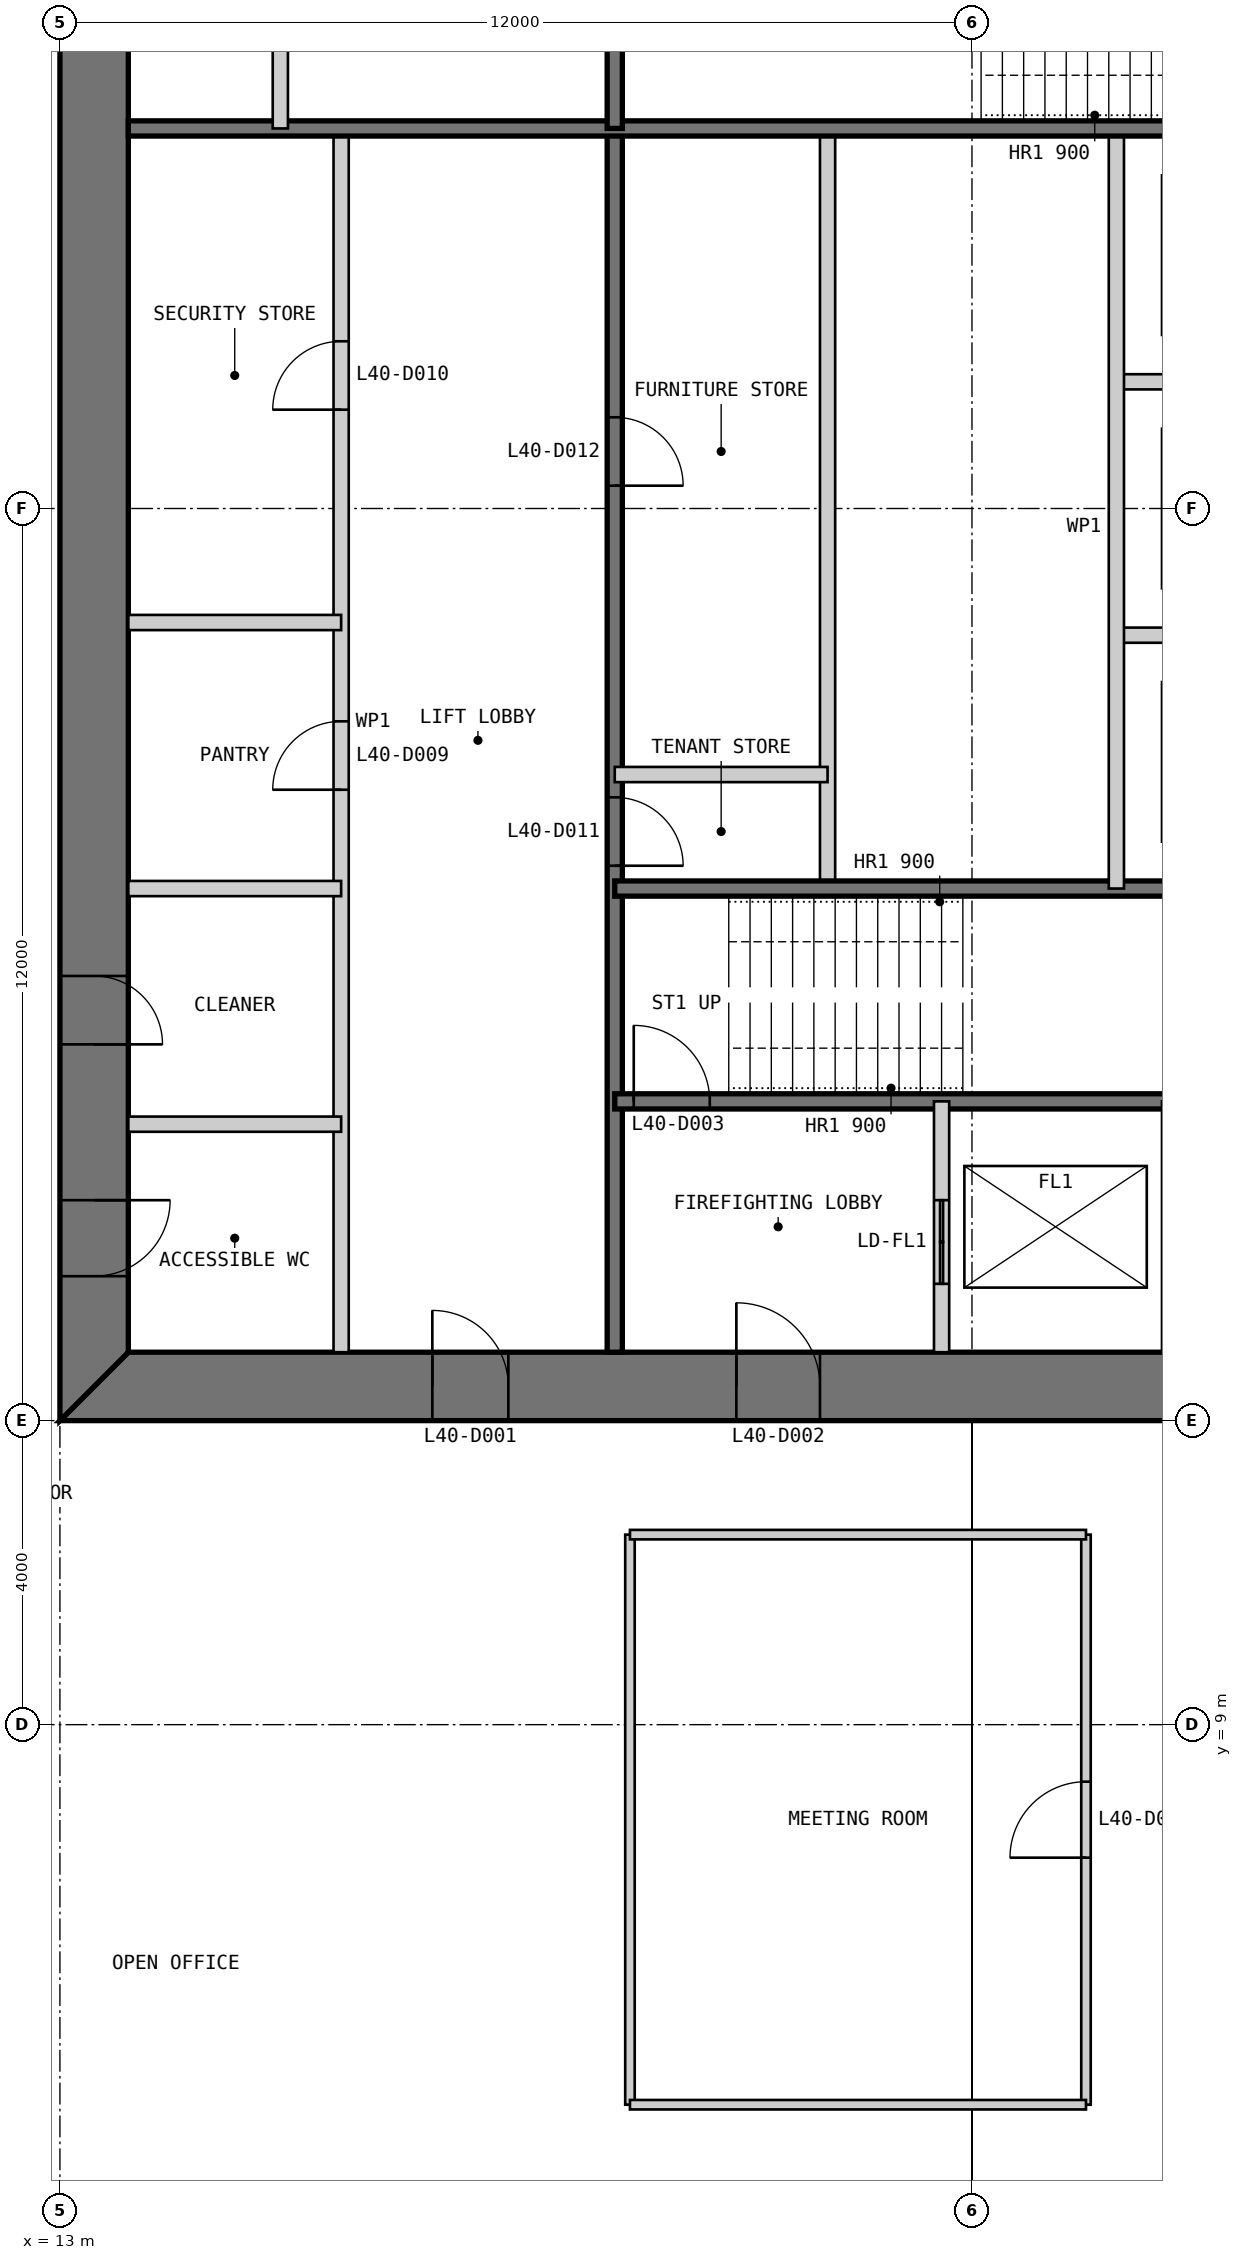
"""IFC4 building model, lengths in metres.
Left out: names, types, materials, properties, quantities, classifications, styles, units other than length and angle.
Written with IfcOpenShell. Run it as: python <this file> out.ifc"""

import sys

from ifc_helpers import new_model, si_unit, direction, frame, frame_2d, origin, place, context, subcontext, project, spatial, polyline, rectangle, outline, extrude, element, fill, save


model = new_model("IFC4")
c1 = context("Model", 3, precision=1e-05, world=origin(), true_north=direction((0.0, 1.0)))
c2 = subcontext(c1, "Body", "Model", "MODEL_VIEW")
j1 = project(units=[si_unit("LENGTHUNIT", "METRE"), si_unit("PLANEANGLEUNIT", "RADIAN")], contexts=[c1])
p1 = place(None, origin())
s1 = spatial("IfcSite", under=j1, at=p1, CompositionType="ELEMENT")
p2 = place(p1, origin())
s2 = spatial("IfcBuilding", under=s1, at=p2, CompositionType="ELEMENT")
p3 = place(p2, frame((0.0, 0.0, 173.8)))
s3 = spatial("IfcBuildingStorey", under=s2, at=p3, CompositionType="ELEMENT", Elevation=173.8)
p4 = place(p3, frame((13.0, 13.45, 0.0), z_axis=(0.0, 0.0, 1.0), x_axis=(1.0, 0.0, 0.0)))
e1 = element("IfcWall", 1, at=p4, inside=s3, PredefinedType="SHEAR", context=c2, shape_type="SweptSolid", body=[
    extrude(outline(polyline([(0.0, -0.45), (24.0, -0.45), (23.1, 0.45), (0.9, 0.45), (0.0, -0.45)])), origin(), (0.0, 0.0, 1.0), 4.0),
])
p5 = place(p4, frame((4.9, 0.0, 0.0)))
e2 = element("IfcOpeningElement", 2, at=p5, cuts=e1, PredefinedType="OPENING", context=c2, shape_type="SweptSolid", body=[
    extrude(rectangle(XDim=1.0, YDim=2.2, at=frame_2d((0.5, 1.1))), frame((0.0, 0.46, 0.0), z_axis=(0.0, -1.0, 0.0), x_axis=(1.0, 0.0, 0.0)), (0.0, 0.0, 1.0), 0.92),
])
p6 = place(p4, frame((8.9, 0.0, 0.0)))
e3 = element("IfcOpeningElement", 3, at=p6, cuts=e1, PredefinedType="OPENING", context=c2, shape_type="SweptSolid", body=[
    extrude(rectangle(XDim=1.1, YDim=2.2, at=frame_2d((0.55, 1.1))), frame((0.0, 0.46, 0.0), z_axis=(0.0, -1.0, 0.0), x_axis=(1.0, 0.0, 0.0)), (0.0, 0.0, 1.0), 0.92),
])
p7 = place(p4, frame((15.05, 0.0, 0.0)))
e4 = element("IfcOpeningElement", 4, at=p7, cuts=e1, PredefinedType="OPENING", context=c2, shape_type="SweptSolid", body=[
    extrude(rectangle(XDim=0.9, YDim=2.2, at=frame_2d((0.45, 1.1))), frame((0.0, 0.46, 0.0), z_axis=(0.0, -1.0, 0.0), x_axis=(1.0, 0.0, 0.0)), (0.0, 0.0, 1.0), 0.92),
])
p8 = place(p4, frame((17.9, 0.0, 0.0)))
e5 = element("IfcOpeningElement", 5, at=p8, cuts=e1, PredefinedType="OPENING", context=c2, shape_type="SweptSolid", body=[
    extrude(rectangle(XDim=1.0, YDim=2.2, at=frame_2d((0.5, 1.1))), frame((0.0, 0.46, 0.0), z_axis=(0.0, -1.0, 0.0), x_axis=(1.0, 0.0, 0.0)), (0.0, 0.0, 1.0), 0.92),
])
p9 = place(p4, frame((21.4, 0.0, 0.0)))
e6 = element("IfcOpeningElement", 6, at=p9, cuts=e1, PredefinedType="OPENING", context=c2, shape_type="SweptSolid", body=[
    extrude(rectangle(XDim=1.0, YDim=2.2, at=frame_2d((0.5, 1.1))), frame((0.0, 0.46, 0.0), z_axis=(0.0, -1.0, 0.0), x_axis=(1.0, 0.0, 0.0)), (0.0, 0.0, 1.0), 0.92),
])
p10 = place(p3, frame((13.45, 36.1, 0.0), z_axis=(0.0, 0.0, 1.0), x_axis=(0.0, -1.0, 0.0)))
e7 = element("IfcWall", 7, at=p10, inside=s3, PredefinedType="SHEAR", context=c2, shape_type="SweptSolid", body=[
    extrude(outline(polyline([(-0.9, -0.45), (23.1, -0.45), (22.2, 0.45), (0.0, 0.45), (-0.9, -0.45)])), origin(), (0.0, 0.0, 1.0), 4.0),
])
p11 = place(p10, frame((20.2, 0.0, 0.0)))
e8 = element("IfcOpeningElement", 8, at=p11, cuts=e7, PredefinedType="OPENING", context=c2, shape_type="SweptSolid", body=[
    extrude(rectangle(XDim=1.0, YDim=2.2, at=frame_2d((0.5, 1.1))), frame((0.0, 0.46, 0.0), z_axis=(0.0, -1.0, 0.0), x_axis=(1.0, 0.0, 0.0)), (0.0, 0.0, 1.0), 0.92),
])
p12 = place(p10, frame((17.25, 0.0, 0.0)))
e9 = element("IfcOpeningElement", 9, at=p12, cuts=e7, PredefinedType="OPENING", context=c2, shape_type="SweptSolid", body=[
    extrude(rectangle(XDim=0.9, YDim=2.2, at=frame_2d((0.45, 1.1))), frame((0.0, 0.46, 0.0), z_axis=(0.0, -1.0, 0.0), x_axis=(1.0, 0.0, 0.0)), (0.0, 0.0, 1.0), 0.92),
])
p13 = place(p3, frame((16.7, 13.9, 0.0), z_axis=(0.0, 0.0, 1.0), x_axis=(0.0, 1.0, 0.0)))
e10 = element("IfcWall", 10, at=p13, inside=s3, PredefinedType="PARTITIONING", context=c2, shape_type="SweptSolid", body=[
    extrude(rectangle(XDim=16.1, YDim=0.2, at=frame_2d((8.05, 0.0))), origin(), (0.0, 0.0, 1.0), 3.8),
])
p14 = place(p13, frame((7.4, 0.0, 0.0)))
e11 = element("IfcOpeningElement", 11, at=p14, cuts=e10, PredefinedType="OPENING", context=c2, shape_type="SweptSolid", body=[
    extrude(rectangle(XDim=0.9, YDim=2.2, at=frame_2d((0.45, 1.1))), frame((0.0, 0.11, 0.0), z_axis=(0.0, -1.0, 0.0), x_axis=(1.0, 0.0, 0.0)), (0.0, 0.0, 1.0), 0.22),
])
p15 = place(p13, frame((12.4, 0.0, 0.0)))
e12 = element("IfcOpeningElement", 12, at=p15, cuts=e10, PredefinedType="OPENING", context=c2, shape_type="SweptSolid", body=[
    extrude(rectangle(XDim=0.9, YDim=2.2, at=frame_2d((0.45, 1.1))), frame((0.0, 0.11, 0.0), z_axis=(0.0, -1.0, 0.0), x_axis=(1.0, 0.0, 0.0)), (0.0, 0.0, 1.0), 0.22),
])
p16 = place(p3, frame((20.3, 13.9, 0.0), z_axis=(0.0, 0.0, 1.0), x_axis=(0.0, 1.0, 0.0)))
e13 = element("IfcWall", 13, at=p16, inside=s3, PredefinedType="SOLIDWALL", context=c2, shape_type="SweptSolid", body=[
    extrude(rectangle(XDim=16.1, YDim=0.2, at=frame_2d((8.05, 0.0))), origin(), (0.0, 0.0, 1.0), 3.8),
])
p17 = place(p16, frame((6.4, 0.0, 0.0)))
e14 = element("IfcOpeningElement", 14, at=p17, cuts=e13, PredefinedType="OPENING", context=c2, shape_type="SweptSolid", body=[
    extrude(rectangle(XDim=0.9, YDim=2.2, at=frame_2d((0.45, 1.1))), frame((0.0, 0.11, 0.0), z_axis=(0.0, -1.0, 0.0), x_axis=(1.0, 0.0, 0.0)), (0.0, 0.0, 1.0), 0.22),
])
p18 = place(p16, frame((11.4, 0.0, 0.0)))
e15 = element("IfcOpeningElement", 15, at=p18, cuts=e13, PredefinedType="OPENING", context=c2, shape_type="SweptSolid", body=[
    extrude(rectangle(XDim=0.9, YDim=2.2, at=frame_2d((0.45, 1.1))), frame((0.0, 0.11, 0.0), z_axis=(0.0, -1.0, 0.0), x_axis=(1.0, 0.0, 0.0)), (0.0, 0.0, 1.0), 0.22),
])
p19 = place(p3, frame((23.1, 20.0, 0.0), z_axis=(0.0, 0.0, 1.0), x_axis=(0.0, 1.0, 0.0)))
e16 = element("IfcWall", 16, at=p19, inside=s3, PredefinedType="PARTITIONING", context=c2, shape_type="SweptSolid", body=[
    extrude(rectangle(XDim=10.0, YDim=0.2, at=frame_2d((5.0, 0.0))), origin(), (0.0, 0.0, 1.0), 3.8),
])
p20 = place(p3, frame((20.3, 17.2, 0.0), z_axis=(0.0, 0.0, 1.0), x_axis=(1.0, 0.0, 0.0)))
e17 = element("IfcWall", 17, at=p20, inside=s3, PredefinedType="SOLIDWALL", context=c2, shape_type="SweptSolid", body=[
    extrude(rectangle(XDim=9.4, YDim=0.2, at=frame_2d((4.7, 0.0))), origin(), (0.0, 0.0, 1.0), 3.8),
])
p21 = place(p20, frame((0.25, 0.0, 0.0)))
e18 = element("IfcOpeningElement", 18, at=p21, cuts=e17, PredefinedType="OPENING", context=c2, shape_type="SweptSolid", body=[
    extrude(rectangle(XDim=1.0, YDim=2.2, at=frame_2d((0.5, 1.1))), frame((0.0, 0.11, 0.0), z_axis=(0.0, -1.0, 0.0), x_axis=(1.0, 0.0, 0.0)), (0.0, 0.0, 1.0), 0.22),
])
p22 = place(p3, frame((20.3, 20.0, 0.0), z_axis=(0.0, 0.0, 1.0), x_axis=(1.0, 0.0, 0.0)))
e19 = element("IfcWall", 19, at=p22, inside=s3, PredefinedType="SOLIDWALL", context=c2, shape_type="SweptSolid", body=[
    extrude(rectangle(XDim=15.8, YDim=0.2, at=frame_2d((7.9, 0.0))), origin(), (0.0, 0.0, 1.0), 3.8),
])
p23 = place(p3, frame((24.6, 13.9, 0.0), z_axis=(0.0, 0.0, 1.0), x_axis=(0.0, 1.0, 0.0)))
e20 = element("IfcWall", 20, at=p23, inside=s3, PredefinedType="PARTITIONING", context=c2, shape_type="SweptSolid", body=[
    extrude(rectangle(XDim=3.3, YDim=0.2, at=frame_2d((1.65, 0.0))), origin(), (0.0, 0.0, 1.0), 3.8),
])
p24 = place(p23, frame((0.9, 0.0, 0.0)))
e21 = element("IfcOpeningElement", 21, at=p24, cuts=e20, PredefinedType="OPENING", context=c2, shape_type="SweptSolid", body=[
    extrude(rectangle(XDim=1.1, YDim=2.2, at=frame_2d((0.55, 1.1))), frame((0.0, 0.11, 0.0), z_axis=(0.0, -1.0, 0.0), x_axis=(1.0, 0.0, 0.0)), (0.0, 0.0, 1.0), 0.22),
])
for number, where, z_axis, x_axis in (
    (22, (13.9, 16.9, 0.0), (0.0, 0.0, 1.0), (1.0, 0.0, 0.0)),
    (23, (13.9, 20.0, 0.0), (0.0, 0.0, 1.0), (1.0, 0.0, 0.0)),
    (24, (13.9, 23.5, 0.0), (0.0, 0.0, 1.0), (1.0, 0.0, 0.0)),
    (25, (20.3, 21.5, 0.0), (0.0, 0.0, 1.0), (1.0, 0.0, 0.0)),
    (26, (29.7, 26.667, 0.0), (0.0, 0.0, 1.0), (-1.0, 0.0, 0.0)),
    (27, (29.7, 23.333, 0.0), (0.0, 0.0, 1.0), (-1.0, 0.0, 0.0)),
):
    element("IfcWall", number, at=place(p3, frame(where, z_axis=z_axis, x_axis=x_axis)), inside=s3, PredefinedType="PARTITIONING", context=c2, shape_type="SweptSolid", body=[
        extrude(rectangle(XDim=2.8, YDim=0.2, at=frame_2d((1.4, 0.0))), origin(), (0.0, 0.0, 1.0), 3.8),
    ])
p25 = place(p3, frame((26.9, 30.0, 0.0), z_axis=(0.0, 0.0, 1.0), x_axis=(0.0, -1.0, 0.0)))
e28 = element("IfcWall", 28, at=p25, inside=s3, PredefinedType="PARTITIONING", context=c2, shape_type="SweptSolid", body=[
    extrude(rectangle(XDim=10.0, YDim=0.2, at=frame_2d((5.0, 0.0))), origin(), (0.0, 0.0, 1.0), 3.8),
])
p26 = place(p3, frame((29.7, 30.0, 0.0), z_axis=(0.0, 0.0, 1.0), x_axis=(-1.0, 0.0, 0.0)))
e29 = element("IfcWall", 29, at=p26, inside=s3, PredefinedType="SOLIDWALL", context=c2, shape_type="SweptSolid", body=[
    extrude(rectangle(XDim=15.8, YDim=0.2, at=frame_2d((7.9, 0.0))), origin(), (0.0, 0.0, 1.0), 3.8),
])
p27 = place(p3, frame((20.3, 36.1, 0.0), z_axis=(0.0, 0.0, 1.0), x_axis=(0.0, -1.0, 0.0)))
e30 = element("IfcWall", 30, at=p27, inside=s3, PredefinedType="SOLIDWALL", context=c2, shape_type="SweptSolid", body=[
    extrude(rectangle(XDim=6.1, YDim=0.2, at=frame_2d((3.05, 0.0))), origin(), (0.0, 0.0, 1.0), 3.8),
])
p28 = place(p3, frame((15.9, 36.1, 0.0), z_axis=(0.0, 0.0, 1.0), x_axis=(0.0, -1.0, 0.0)))
e31 = element("IfcWall", 31, at=p28, inside=s3, PredefinedType="PARTITIONING", context=c2, shape_type="SweptSolid", body=[
    extrude(rectangle(XDim=6.1, YDim=0.2, at=frame_2d((3.05, 0.0))), origin(), (0.0, 0.0, 1.0), 3.8),
])
p29 = place(p3, frame((20.5, 4.0, 0.0), z_axis=(0.0, 0.0, 1.0), x_axis=(0.0, 1.0, 0.0)))
e32 = element("IfcWall", 32, at=p29, inside=s3, PredefinedType="PARTITIONING", context=c2, shape_type="SweptSolid", body=[
    extrude(rectangle(XDim=7.5, YDim=0.125, at=frame_2d((3.75, 0.0))), origin(), (0.0, 0.0, 1.0), 3.85),
])
p30 = place(p3, frame((26.5, 4.0, 0.0), z_axis=(0.0, 0.0, 1.0), x_axis=(0.0, 1.0, 0.0)))
e33 = element("IfcWall", 33, at=p30, inside=s3, PredefinedType="PARTITIONING", context=c2, shape_type="SweptSolid", body=[
    extrude(rectangle(XDim=7.5, YDim=0.125, at=frame_2d((3.75, 0.0))), origin(), (0.0, 0.0, 1.0), 3.85),
])
p31 = place(p30, frame((3.25, 0.0, 0.0)))
e34 = element("IfcOpeningElement", 34, at=p31, cuts=e33, PredefinedType="OPENING", context=c2, shape_type="SweptSolid", body=[
    extrude(rectangle(XDim=1.0, YDim=2.2, at=frame_2d((0.5, 1.1))), frame((0.0, 0.073, 0.0), z_axis=(0.0, -1.0, 0.0), x_axis=(1.0, 0.0, 0.0)), (0.0, 0.0, 1.0), 0.145),
])
for number, where, z_axis, x_axis in (
    (35, (20.5, 4.0, 0.0), (0.0, 0.0, 1.0), (1.0, 0.0, 0.0)),
    (36, (20.5, 11.5, 0.0), (0.0, 0.0, 1.0), (1.0, 0.0, 0.0)),
):
    element("IfcWall", number, at=place(p3, frame(where, z_axis=z_axis, x_axis=x_axis)), inside=s3, PredefinedType="PARTITIONING", context=c2, shape_type="SweptSolid", body=[
        extrude(rectangle(XDim=6.0, YDim=0.125, at=frame_2d((3.0, 0.0))), origin(), (0.0, 0.0, 1.0), 3.85),
    ])
p32 = place(p5, origin())
e37 = element("IfcDoor", 37, at=p32, inside=s3, OperationType="SINGLE_SWING_LEFT", PredefinedType="DOOR", context=c2, shape_type="SweptSolid", body=[
    extrude(rectangle(XDim=1.0, YDim=2.2, at=frame_2d((0.5, 1.1))), frame((0.0, 0.025, 0.0), z_axis=(0.0, -1.0, 0.0), x_axis=(1.0, 0.0, 0.0)), (0.0, 0.0, 1.0), 0.05),
    extrude(outline(polyline([(0.0, 0.0), (0.04, 0.0), (0.04, 2.16), (0.96, 2.16), (0.96, 0.0), (1.0, 0.0), (1.0, 2.2), (0.0, 2.2), (0.0, 0.0)])), frame((0.0, 0.3, 0.0), z_axis=(0.0, -1.0, 0.0), x_axis=(1.0, 0.0, 0.0)), (0.0, 0.0, 1.0), 0.6),
])
fill(e2, e37)
p33 = place(p6, origin())
e38 = element("IfcDoor", 38, at=p33, inside=s3, OperationType="SINGLE_SWING_LEFT", PredefinedType="DOOR", context=c2, shape_type="SweptSolid", body=[
    extrude(rectangle(XDim=1.1, YDim=2.2, at=frame_2d((0.55, 1.1))), frame((0.0, 0.025, 0.0), z_axis=(0.0, -1.0, 0.0), x_axis=(1.0, 0.0, 0.0)), (0.0, 0.0, 1.0), 0.05),
    extrude(outline(polyline([(0.0, 0.0), (0.04, 0.0), (0.04, 2.16), (1.06, 2.16), (1.06, 0.0), (1.1, 0.0), (1.1, 2.2), (0.0, 2.2), (0.0, 0.0)])), frame((0.0, 0.3, 0.0), z_axis=(0.0, -1.0, 0.0), x_axis=(1.0, 0.0, 0.0)), (0.0, 0.0, 1.0), 0.6),
])
fill(e3, e38)
p34 = place(p21, origin())
e39 = element("IfcDoor", 39, at=p34, inside=s3, OperationType="SINGLE_SWING_LEFT", PredefinedType="DOOR", context=c2, shape_type="SweptSolid", body=[
    extrude(rectangle(XDim=1.0, YDim=2.2, at=frame_2d((0.5, 1.1))), frame((0.0, 0.025, 0.0), z_axis=(0.0, -1.0, 0.0), x_axis=(1.0, 0.0, 0.0)), (0.0, 0.0, 1.0), 0.05),
])
fill(e18, e39)
p35 = place(p11, origin())
e40 = element("IfcDoor", 40, at=p35, inside=s3, OperationType="SINGLE_SWING_LEFT", PredefinedType="DOOR", context=c2, shape_type="SweptSolid", body=[
    extrude(rectangle(XDim=1.0, YDim=2.2, at=frame_2d((0.5, 1.1))), frame((0.0, 0.025, 0.0), z_axis=(0.0, -1.0, 0.0), x_axis=(1.0, 0.0, 0.0)), (0.0, 0.0, 1.0), 0.05),
    extrude(outline(polyline([(0.0, 0.0), (0.04, 0.0), (0.04, 2.16), (0.96, 2.16), (0.96, 0.0), (1.0, 0.0), (1.0, 2.2), (0.0, 2.2), (0.0, 0.0)])), frame((0.0, 0.3, 0.0), z_axis=(0.0, -1.0, 0.0), x_axis=(1.0, 0.0, 0.0)), (0.0, 0.0, 1.0), 0.6),
])
fill(e8, e40)
p36 = place(p12, origin())
e41 = element("IfcDoor", 41, at=p36, inside=s3, OperationType="SINGLE_SWING_RIGHT", PredefinedType="DOOR", context=c2, shape_type="SweptSolid", body=[
    extrude(rectangle(XDim=0.9, YDim=2.2, at=frame_2d((0.45, 1.1))), frame((0.0, 0.025, 0.0), z_axis=(0.0, -1.0, 0.0), x_axis=(1.0, 0.0, 0.0)), (0.0, 0.0, 1.0), 0.05),
    extrude(outline(polyline([(0.0, 0.0), (0.04, 0.0), (0.04, 2.16), (0.86, 2.16), (0.86, 0.0), (0.9, 0.0), (0.9, 2.2), (0.0, 2.2), (0.0, 0.0)])), frame((0.0, 0.3, 0.0), z_axis=(0.0, -1.0, 0.0), x_axis=(1.0, 0.0, 0.0)), (0.0, 0.0, 1.0), 0.6),
])
fill(e9, e41)
p37 = place(p14, origin())
e42 = element("IfcDoor", 42, at=p37, inside=s3, OperationType="SINGLE_SWING_LEFT", PredefinedType="DOOR", context=c2, shape_type="SweptSolid", body=[
    extrude(rectangle(XDim=0.9, YDim=2.2, at=frame_2d((0.45, 1.1))), frame((0.0, 0.025, 0.0), z_axis=(0.0, -1.0, 0.0), x_axis=(1.0, 0.0, 0.0)), (0.0, 0.0, 1.0), 0.05),
])
fill(e11, e42)
p38 = place(p15, origin())
e43 = element("IfcDoor", 43, at=p38, inside=s3, OperationType="SINGLE_SWING_LEFT", PredefinedType="DOOR", context=c2, shape_type="SweptSolid", body=[
    extrude(rectangle(XDim=0.9, YDim=2.2, at=frame_2d((0.45, 1.1))), frame((0.0, 0.025, 0.0), z_axis=(0.0, -1.0, 0.0), x_axis=(1.0, 0.0, 0.0)), (0.0, 0.0, 1.0), 0.05),
])
fill(e12, e43)
p39 = place(p17, frame((0.9, 0.0, 0.0), z_axis=(0.0, 0.0, 1.0), x_axis=(-1.0, 0.0, 0.0)))
e44 = element("IfcDoor", 44, at=p39, inside=s3, OperationType="SINGLE_SWING_RIGHT", PredefinedType="DOOR", context=c2, shape_type="SweptSolid", body=[
    extrude(rectangle(XDim=0.9, YDim=2.2, at=frame_2d((0.45, 1.1))), frame((0.0, 0.025, 0.0), z_axis=(0.0, -1.0, 0.0), x_axis=(1.0, 0.0, 0.0)), (0.0, 0.0, 1.0), 0.05),
])
fill(e14, e44)
p40 = place(p18, frame((0.9, 0.0, 0.0), z_axis=(0.0, 0.0, 1.0), x_axis=(-1.0, 0.0, 0.0)))
e45 = element("IfcDoor", 45, at=p40, inside=s3, OperationType="SINGLE_SWING_RIGHT", PredefinedType="DOOR", context=c2, shape_type="SweptSolid", body=[
    extrude(rectangle(XDim=0.9, YDim=2.2, at=frame_2d((0.45, 1.1))), frame((0.0, 0.025, 0.0), z_axis=(0.0, -1.0, 0.0), x_axis=(1.0, 0.0, 0.0)), (0.0, 0.0, 1.0), 0.05),
])
fill(e15, e45)
p41 = place(p31, origin())
e46 = element("IfcDoor", 46, at=p41, inside=s3, OperationType="SINGLE_SWING_LEFT", PredefinedType="DOOR", context=c2, shape_type="SweptSolid", body=[
    extrude(rectangle(XDim=1.0, YDim=2.2, at=frame_2d((0.5, 1.1))), frame((0.0, 0.025, 0.0), z_axis=(0.0, -1.0, 0.0), x_axis=(1.0, 0.0, 0.0)), (0.0, 0.0, 1.0), 0.05),
])
fill(e34, e46)
p42 = place(p24, origin())
e47 = element("IfcDoor", 47, at=p42, inside=s3, OperationType="DOUBLE_DOOR_SLIDING", PredefinedType="DOOR", context=c2, shape_type="SweptSolid", body=[
    extrude(rectangle(XDim=1.1, YDim=2.2, at=frame_2d((0.55, 1.1))), frame((0.0, 0.025, 0.0), z_axis=(0.0, -1.0, 0.0), x_axis=(1.0, 0.0, 0.0)), (0.0, 0.0, 1.0), 0.05),
])
fill(e21, e47)
save(model, sys.argv[1])
